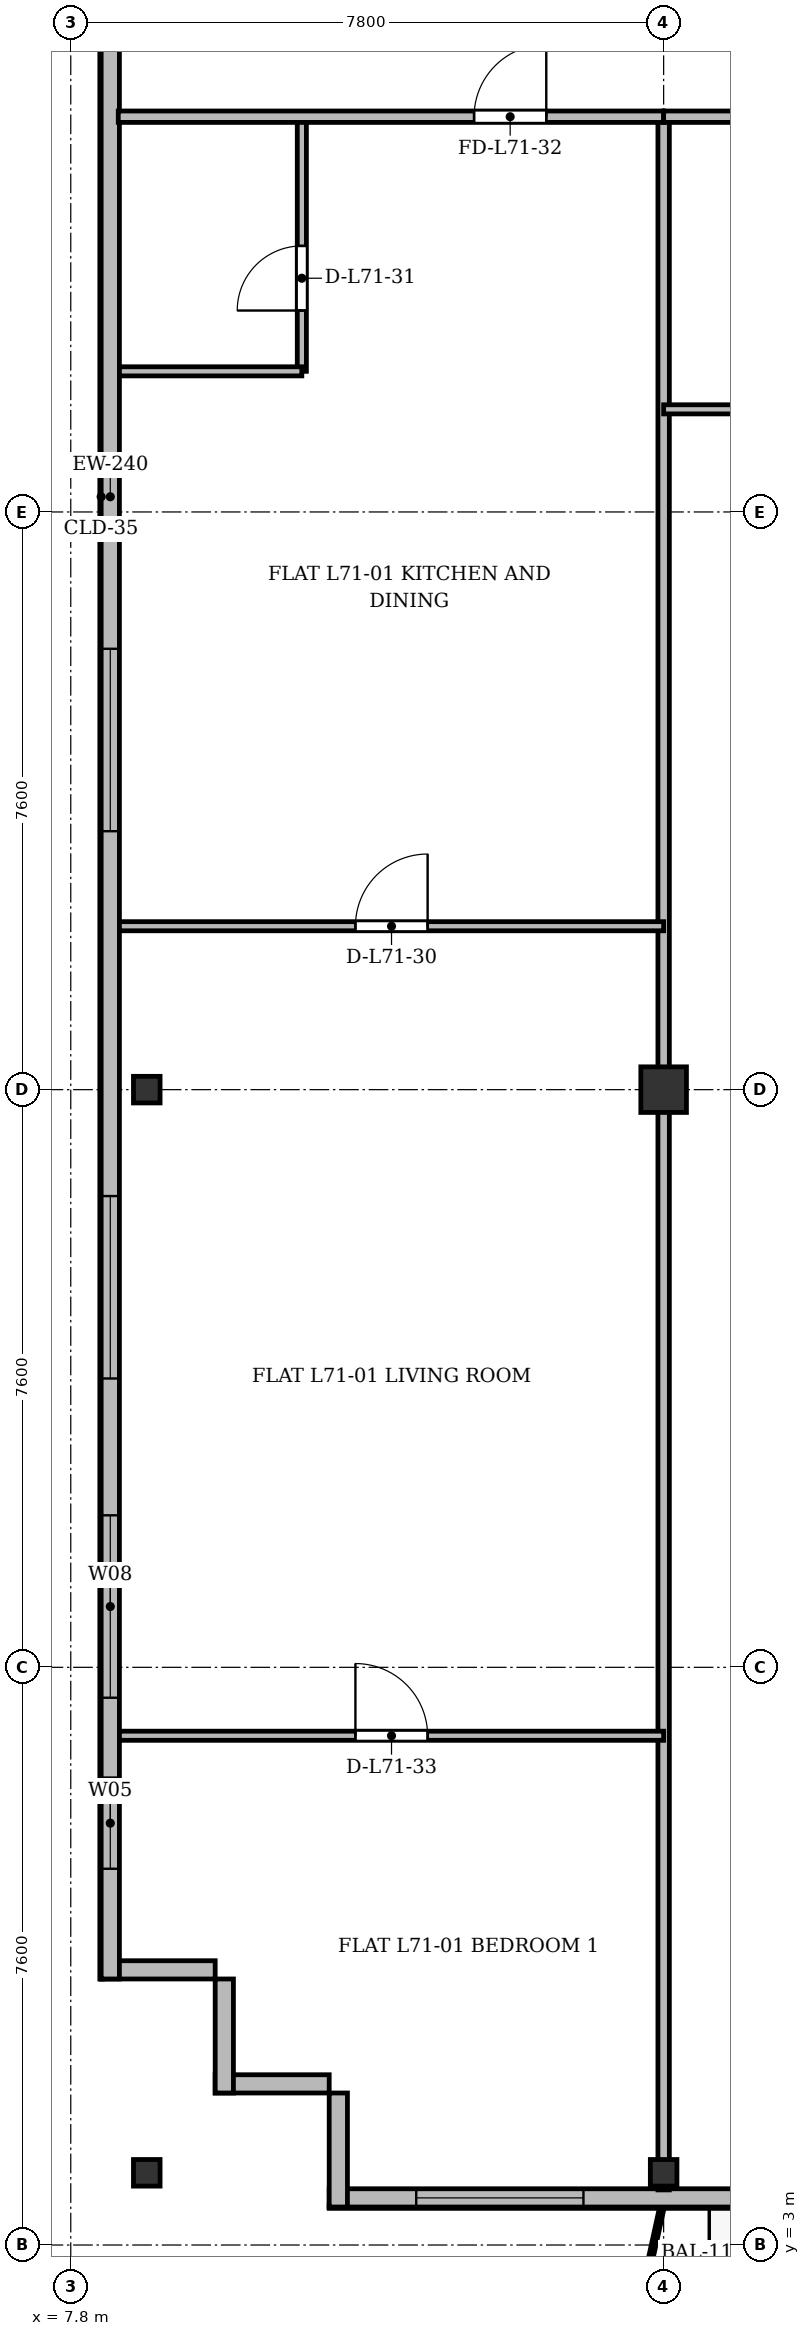
"""IFC4 building model, lengths in metres.
Left out: names, types, materials, properties, quantities, classifications, styles, units other than length and angle.
Written with IfcOpenShell. Run it as: python <this file> out.ifc"""

import sys

from ifc_helpers import new_model, si_unit, direction, frame, frame_2d, origin, origin_2d, place, context, subcontext, project, spatial, rectangle, i_section, extrude, source, transform, mapped, element, fill, save


model = new_model("IFC4")
c1 = context("Model", 3, precision=1e-05, world=origin(), true_north=direction((0.0, 1.0)))
c2 = subcontext(c1, "Body", "Model", "MODEL_VIEW")
j1 = project(units=[si_unit("LENGTHUNIT", "METRE"), si_unit("PLANEANGLEUNIT", "RADIAN")], contexts=[c1])
p1 = place(None, origin())
s1 = spatial("IfcSite", under=j1, at=p1, CompositionType="ELEMENT")
p2 = place(p1, origin())
s2 = spatial("IfcBuilding", under=s1, at=p2, CompositionType="ELEMENT")
p3 = place(p2, frame((0.0, 0.0, 273.9)))
s3 = spatial("IfcBuildingStorey", under=s2, at=p3, CompositionType="ELEMENT", Elevation=273.9)
m1 = source(origin(), c2, "Body", "SweptSolid", [
    extrude(i_section(OverallWidth=0.35, OverallDepth=0.35, WebThickness=0.018, FlangeThickness=0.028, at=origin_2d()), origin(), (0.0, 0.0, 1.0), 3.6),
])
for number, where, z_axis, x_axis in (
    (1, (8.8, 3.95, 0.0), (0.0, 0.0, 1.0), (1.0, 0.0, 0.0)),
    (2, (8.8, 18.2, 0.0), (0.0, 0.0, 1.0), (1.0, 0.0, 0.0)),
    (3, (15.6, 3.95, 0.0), (0.0, 0.0, 1.0), (1.0, 0.0, 0.0)),
):
    element("IfcColumn", number, at=place(p3, frame(where, z_axis=z_axis, x_axis=x_axis)), inside=s3, PredefinedType="COLUMN", context=c2, shape_type="MappedRepresentation", body=[
        mapped(m1, transform((0.0, 0.0, 0.0), x_axis=(1.0, 0.0, 0.0), y_axis=(0.0, 1.0, 0.0), z_axis=(0.0, 0.0, 1.0), scale=1.0)),
    ])
m2 = source(origin(), c2, "Body", "SweptSolid", [
    extrude(rectangle(XDim=0.6, YDim=0.6, at=origin_2d()), origin(), (0.0, 0.0, 1.0), 3.6),
])
p4 = place(p3, frame((15.6, 18.2, 0.0), z_axis=(0.0, 0.0, 1.0), x_axis=(1.0, 0.0, 0.0)))
e4 = element("IfcColumn", 4, at=p4, inside=s3, PredefinedType="COLUMN", context=c2, shape_type="MappedRepresentation", body=[
    mapped(m2, transform((0.0, 0.0, 0.0), x_axis=(1.0, 0.0, 0.0), y_axis=(0.0, 1.0, 0.0), z_axis=(0.0, 0.0, 1.0), scale=1.0)),
])
for number, where, z_axis, x_axis in (
    (5, (11.2, 5.12, 0.0), (0.0, 0.0, 1.0), (-1.0, 0.0, 0.0)),
    (6, (9.82, 5.0, 0.0), (0.0, 0.0, 1.0), (0.0, 1.0, 0.0)),
):
    element("IfcWall", number, at=place(p3, frame(where, z_axis=z_axis, x_axis=x_axis)), inside=s3, PredefinedType="SOLIDWALL", context=c2, shape_type="SweptSolid", body=[
        extrude(rectangle(XDim=1.5, YDim=0.24, at=frame_2d((0.75, 0.0))), origin(), (0.0, 0.0, 1.0), 3.37),
    ])
p5 = place(p3, frame((9.7, 6.62, 0.0), z_axis=(0.0, 0.0, 1.0), x_axis=(-1.0, 0.0, 0.0)))
e7 = element("IfcWall", 7, at=p5, inside=s3, PredefinedType="SOLIDWALL", context=c2, shape_type="SweptSolid", body=[
    extrude(rectangle(XDim=1.5, YDim=0.24, at=frame_2d((0.75, 0.0))), origin(), (0.0, 0.0, 1.0), 2.87),
])
p6 = place(p3, frame((8.32, 6.5, 0.0), z_axis=(0.0, 0.0, 1.0), x_axis=(0.0, 1.0, 0.0)))
e8 = element("IfcWall", 8, at=p6, inside=s3, PredefinedType="SOLIDWALL", context=c2, shape_type="SweptSolid", body=[
    extrude(rectangle(XDim=39.0, YDim=0.24, at=frame_2d((19.5, 0.0))), origin(), (0.0, 0.0, 1.0), 3.37),
])
p7 = place(p6, frame((1.45, 0.0, 0.92)))
e9 = element("IfcOpeningElement", 9, at=p7, cuts=e8, PredefinedType="OPENING", context=c2, shape_type="SweptSolid", body=[
    extrude(rectangle(XDim=1.2, YDim=1.65, at=frame_2d((0.6, 0.825))), frame((0.0, 0.13, 0.0), z_axis=(0.0, -1.0, 0.0), x_axis=(1.0, 0.0, 0.0)), (0.0, 0.0, 1.0), 0.26),
])
p8 = place(p6, frame((3.7, 0.0, 0.92)))
e10 = element("IfcOpeningElement", 10, at=p8, cuts=e8, PredefinedType="OPENING", context=c2, shape_type="SweptSolid", body=[
    extrude(rectangle(XDim=2.4, YDim=2.1, at=frame_2d((1.2, 1.05))), frame((0.0, 0.13, 0.0), z_axis=(0.0, -1.0, 0.0), x_axis=(1.0, 0.0, 0.0)), (0.0, 0.0, 1.0), 0.26),
])
p9 = place(p6, frame((7.9, 0.0, 0.92)))
e11 = element("IfcOpeningElement", 11, at=p9, cuts=e8, PredefinedType="OPENING", context=c2, shape_type="SweptSolid", body=[
    extrude(rectangle(XDim=2.4, YDim=2.1, at=frame_2d((1.2, 1.05))), frame((0.0, 0.13, 0.0), z_axis=(0.0, -1.0, 0.0), x_axis=(1.0, 0.0, 0.0)), (0.0, 0.0, 1.0), 0.26),
])
p10 = place(p6, frame((15.1, 0.0, 0.92)))
e12 = element("IfcOpeningElement", 12, at=p10, cuts=e8, PredefinedType="OPENING", context=c2, shape_type="SweptSolid", body=[
    extrude(rectangle(XDim=2.4, YDim=2.1, at=frame_2d((1.2, 1.05))), frame((0.0, 0.13, 0.0), z_axis=(0.0, -1.0, 0.0), x_axis=(1.0, 0.0, 0.0)), (0.0, 0.0, 1.0), 0.26),
])
p11 = place(p6, frame((29.1, 0.0, 0.92)))
e13 = element("IfcOpeningElement", 13, at=p11, cuts=e8, PredefinedType="OPENING", context=c2, shape_type="SweptSolid", body=[
    extrude(rectangle(XDim=2.4, YDim=2.1, at=frame_2d((1.2, 1.05))), frame((0.0, 0.13, 0.0), z_axis=(0.0, -1.0, 0.0), x_axis=(1.0, 0.0, 0.0)), (0.0, 0.0, 1.0), 0.26),
])
p12 = place(p6, frame((33.3, 0.0, 0.92)))
e14 = element("IfcOpeningElement", 14, at=p12, cuts=e8, PredefinedType="OPENING", context=c2, shape_type="SweptSolid", body=[
    extrude(rectangle(XDim=1.2, YDim=1.65, at=frame_2d((0.6, 0.825))), frame((0.0, 0.13, 0.0), z_axis=(0.0, -1.0, 0.0), x_axis=(1.0, 0.0, 0.0)), (0.0, 0.0, 1.0), 0.26),
])
p13 = place(p6, frame((36.65, 0.0, 0.92)))
e15 = element("IfcOpeningElement", 15, at=p13, cuts=e8, PredefinedType="OPENING", context=c2, shape_type="SweptSolid", body=[
    extrude(rectangle(XDim=1.2, YDim=1.65, at=frame_2d((0.6, 0.825))), frame((0.0, 0.13, 0.0), z_axis=(0.0, -1.0, 0.0), x_axis=(1.0, 0.0, 0.0)), (0.0, 0.0, 1.0), 0.26),
])
p14 = place(p3, frame((63.2, 3.62, 0.0), z_axis=(0.0, 0.0, 1.0), x_axis=(-1.0, 0.0, 0.0)))
e16 = element("IfcWall", 16, at=p14, inside=s3, PredefinedType="SOLIDWALL", context=c2, shape_type="SweptSolid", body=[
    extrude(rectangle(XDim=52.0, YDim=0.24, at=frame_2d((26.0, 0.0))), origin(), (0.0, 0.0, 1.0), 3.37),
])
p15 = place(p14, frame((1.145, 0.0, 0.9)))
e17 = element("IfcOpeningElement", 17, at=p15, cuts=e16, PredefinedType="OPENING", context=c2, shape_type="SweptSolid", body=[
    extrude(rectangle(XDim=2.2, YDim=1.8, at=frame_2d((1.1, 0.9))), frame((0.0, 0.13, 0.0), z_axis=(0.0, -1.0, 0.0), x_axis=(1.0, 0.0, 0.0)), (0.0, 0.0, 1.0), 0.26),
])
p16 = place(p14, frame((5.45, 0.0, 0.9)))
e18 = element("IfcOpeningElement", 18, at=p16, cuts=e16, PredefinedType="OPENING", context=c2, shape_type="SweptSolid", body=[
    extrude(rectangle(XDim=1.5, YDim=1.75, at=frame_2d((0.75, 0.875))), frame((0.0, 0.13, 0.0), z_axis=(0.0, -1.0, 0.0), x_axis=(1.0, 0.0, 0.0)), (0.0, 0.0, 1.0), 0.26),
])
p17 = place(p14, frame((9.1, 0.0, 0.9)))
e19 = element("IfcOpeningElement", 19, at=p17, cuts=e16, PredefinedType="OPENING", context=c2, shape_type="SweptSolid", body=[
    extrude(rectangle(XDim=2.0, YDim=1.95, at=frame_2d((1.0, 0.975))), frame((0.0, 0.13, 0.0), z_axis=(0.0, -1.0, 0.0), x_axis=(1.0, 0.0, 0.0)), (0.0, 0.0, 1.0), 0.26),
])
p18 = place(p14, frame((14.017, 0.0, 0.0)))
e20 = element("IfcOpeningElement", 20, at=p18, cuts=e16, PredefinedType="OPENING", context=c2, shape_type="SweptSolid", body=[
    extrude(rectangle(XDim=1.2, YDim=2.2, at=frame_2d((0.6, 1.1))), frame((0.0, 0.13, 0.0), z_axis=(0.0, -1.0, 0.0), x_axis=(1.0, 0.0, 0.0)), (0.0, 0.0, 1.0), 0.26),
])
p19 = place(p14, frame((25.1, 0.0, 0.9)))
e21 = element("IfcOpeningElement", 21, at=p19, cuts=e16, PredefinedType="OPENING", context=c2, shape_type="SweptSolid", body=[
    extrude(rectangle(XDim=1.8, YDim=1.8, at=frame_2d((0.9, 0.9))), frame((0.0, 0.13, 0.0), z_axis=(0.0, -1.0, 0.0), x_axis=(1.0, 0.0, 0.0)), (0.0, 0.0, 1.0), 0.26),
])
p20 = place(p14, frame((33.05, 0.0, 0.9)))
e22 = element("IfcOpeningElement", 22, at=p20, cuts=e16, PredefinedType="OPENING", context=c2, shape_type="SweptSolid", body=[
    extrude(rectangle(XDim=1.5, YDim=1.75, at=frame_2d((0.75, 0.875))), frame((0.0, 0.13, 0.0), z_axis=(0.0, -1.0, 0.0), x_axis=(1.0, 0.0, 0.0)), (0.0, 0.0, 1.0), 0.26),
])
p21 = place(p14, frame((35.45, 0.0, 0.9)))
e23 = element("IfcOpeningElement", 23, at=p21, cuts=e16, PredefinedType="OPENING", context=c2, shape_type="SweptSolid", body=[
    extrude(rectangle(XDim=1.5, YDim=1.75, at=frame_2d((0.75, 0.875))), frame((0.0, 0.13, 0.0), z_axis=(0.0, -1.0, 0.0), x_axis=(1.0, 0.0, 0.0)), (0.0, 0.0, 1.0), 0.26),
])
p22 = place(p14, frame((37.85, 0.0, 0.9)))
e24 = element("IfcOpeningElement", 24, at=p22, cuts=e16, PredefinedType="OPENING", context=c2, shape_type="SweptSolid", body=[
    extrude(rectangle(XDim=1.5, YDim=1.75, at=frame_2d((0.75, 0.875))), frame((0.0, 0.13, 0.0), z_axis=(0.0, -1.0, 0.0), x_axis=(1.0, 0.0, 0.0)), (0.0, 0.0, 1.0), 0.26),
])
p23 = place(p14, frame((41.452, 0.0, 0.0)))
e25 = element("IfcOpeningElement", 25, at=p23, cuts=e16, PredefinedType="OPENING", context=c2, shape_type="SweptSolid", body=[
    extrude(rectangle(XDim=1.2, YDim=2.2, at=frame_2d((0.6, 1.1))), frame((0.0, 0.13, 0.0), z_axis=(0.0, -1.0, 0.0), x_axis=(1.0, 0.0, 0.0)), (0.0, 0.0, 1.0), 0.26),
])
p24 = place(p14, frame((44.5, 0.0, 0.9)))
e26 = element("IfcOpeningElement", 26, at=p24, cuts=e16, PredefinedType="OPENING", context=c2, shape_type="SweptSolid", body=[
    extrude(rectangle(XDim=1.8, YDim=1.8, at=frame_2d((0.9, 0.9))), frame((0.0, 0.13, 0.0), z_axis=(0.0, -1.0, 0.0), x_axis=(1.0, 0.0, 0.0)), (0.0, 0.0, 1.0), 0.26),
])
p25 = place(p14, frame((48.655, 0.0, 0.9)))
e27 = element("IfcOpeningElement", 27, at=p25, cuts=e16, PredefinedType="OPENING", context=c2, shape_type="SweptSolid", body=[
    extrude(rectangle(XDim=2.2, YDim=1.8, at=frame_2d((1.1, 0.9))), frame((0.0, 0.13, 0.0), z_axis=(0.0, -1.0, 0.0), x_axis=(1.0, 0.0, 0.0)), (0.0, 0.0, 1.0), 0.26),
])
p26 = place(p3, frame((11.32, 3.5, 0.0), z_axis=(0.0, 0.0, 1.0), x_axis=(0.0, 1.0, 0.0)))
e28 = element("IfcWall", 28, at=p26, inside=s3, PredefinedType="SOLIDWALL", context=c2, shape_type="SweptSolid", body=[
    extrude(rectangle(XDim=1.5, YDim=0.24, at=frame_2d((0.75, 0.0))), origin(), (0.0, 0.0, 1.0), 2.92),
])
p27 = place(p3, frame((15.6, 3.725, 0.0), z_axis=(0.0, 0.0, 1.0), x_axis=(0.0, 1.0, 0.0)))
e29 = element("IfcWall", 29, at=p27, inside=s3, PredefinedType="PARTITIONING", context=c2, shape_type="SweptSolid", body=[
    extrude(rectangle(XDim=27.275, YDim=0.15, at=frame_2d((13.637, 0.0))), origin(), (0.0, 0.0, 1.0), 2.87),
])
p28 = place(p3, frame((8.44, 20.35, 0.0), z_axis=(0.0, 0.0, 1.0), x_axis=(1.0, 0.0, 0.0)))
e30 = element("IfcWall", 30, at=p28, inside=s3, PredefinedType="PARTITIONING", context=c2, shape_type="SweptSolid", body=[
    extrude(rectangle(XDim=7.16, YDim=0.12, at=frame_2d((3.58, 0.0))), origin(), (0.0, 0.0, 1.0), 2.87),
])
p29 = place(p28, frame((3.105, 0.0, 0.0)))
e31 = element("IfcOpeningElement", 31, at=p29, cuts=e30, PredefinedType="OPENING", context=c2, shape_type="SweptSolid", body=[
    extrude(rectangle(XDim=0.95, YDim=2.15, at=frame_2d((0.475, 1.075))), frame((0.0, 0.07, 0.0), z_axis=(0.0, -1.0, 0.0), x_axis=(1.0, 0.0, 0.0)), (0.0, 0.0, 1.0), 0.14),
])
p30 = place(p3, frame((10.84, 27.65, 0.0), z_axis=(0.0, 0.0, 1.0), x_axis=(0.0, 1.0, 0.0)))
e32 = element("IfcWall", 32, at=p30, inside=s3, PredefinedType="PARTITIONING", context=c2, shape_type="SweptSolid", body=[
    extrude(rectangle(XDim=3.35, YDim=0.12, at=frame_2d((1.675, 0.0))), origin(), (0.0, 0.0, 1.0), 3.37),
])
p31 = place(p30, frame((0.8, 0.0, 0.0)))
e33 = element("IfcOpeningElement", 33, at=p31, cuts=e32, PredefinedType="OPENING", context=c2, shape_type="SweptSolid", body=[
    extrude(rectangle(XDim=0.85, YDim=2.1, at=frame_2d((0.425, 1.05))), frame((0.0, 0.07, 0.0), z_axis=(0.0, -1.0, 0.0), x_axis=(1.0, 0.0, 0.0)), (0.0, 0.0, 1.0), 0.14),
])
p32 = place(p3, frame((8.44, 27.65, 0.0), z_axis=(0.0, 0.0, 1.0), x_axis=(1.0, 0.0, 0.0)))
e34 = element("IfcWall", 34, at=p32, inside=s3, PredefinedType="PARTITIONING", context=c2, shape_type="SweptSolid", body=[
    extrude(rectangle(XDim=2.4, YDim=0.12, at=frame_2d((1.2, 0.0))), origin(), (0.0, 0.0, 1.0), 2.87),
])
p33 = place(p3, frame((8.425, 31.0, 0.0), z_axis=(0.0, 0.0, 1.0), x_axis=(1.0, 0.0, 0.0)))
e35 = element("IfcWall", 35, at=p33, inside=s3, PredefinedType="PARTITIONING", context=c2, shape_type="SweptSolid", body=[
    extrude(rectangle(XDim=7.175, YDim=0.15, at=frame_2d((3.587, 0.0))), origin(), (0.0, 0.0, 1.0), 2.87),
])
p34 = place(p33, frame((4.681, 0.0, 0.0)))
e36 = element("IfcOpeningElement", 36, at=p34, cuts=e35, PredefinedType="OPENING", context=c2, shape_type="SweptSolid", body=[
    extrude(rectangle(XDim=0.95, YDim=2.15, at=frame_2d((0.475, 1.075))), frame((0.0, 0.085, 0.0), z_axis=(0.0, -1.0, 0.0), x_axis=(1.0, 0.0, 0.0)), (0.0, 0.0, 1.0), 0.17),
])
p35 = place(p3, frame((8.44, 9.7, 0.0), z_axis=(0.0, 0.0, 1.0), x_axis=(1.0, 0.0, 0.0)))
e37 = element("IfcWall", 37, at=p35, inside=s3, PredefinedType="PARTITIONING", context=c2, shape_type="SweptSolid", body=[
    extrude(rectangle(XDim=7.16, YDim=0.12, at=frame_2d((3.58, 0.0))), origin(), (0.0, 0.0, 1.0), 2.87),
])
p36 = place(p35, frame((3.105, 0.0, 0.0)))
e38 = element("IfcOpeningElement", 38, at=p36, cuts=e37, PredefinedType="OPENING", context=c2, shape_type="SweptSolid", body=[
    extrude(rectangle(XDim=0.95, YDim=2.15, at=frame_2d((0.475, 1.075))), frame((0.0, 0.07, 0.0), z_axis=(0.0, -1.0, 0.0), x_axis=(1.0, 0.0, 0.0)), (0.0, 0.0, 1.0), 0.14),
])
p37 = place(p3, frame((15.6, 31.0, 0.0), z_axis=(0.0, 0.0, 1.0), x_axis=(1.0, 0.0, 0.0)))
e39 = element("IfcWall", 39, at=p37, inside=s3, PredefinedType="PARTITIONING", context=c2, shape_type="SweptSolid", body=[
    extrude(rectangle(XDim=4.4, YDim=0.15, at=frame_2d((2.2, 0.0))), origin(), (0.0, 0.0, 1.0), 2.87),
])
p38 = place(p37, frame((1.725, 0.0, 0.0)))
e40 = element("IfcOpeningElement", 40, at=p38, cuts=e39, PredefinedType="OPENING", context=c2, shape_type="SweptSolid", body=[
    extrude(rectangle(XDim=0.95, YDim=2.15, at=frame_2d((0.475, 1.075))), frame((0.0, 0.085, 0.0), z_axis=(0.0, -1.0, 0.0), x_axis=(1.0, 0.0, 0.0)), (0.0, 0.0, 1.0), 0.17),
])
p39 = place(p3, frame((15.6, 27.15, 0.0), z_axis=(0.0, 0.0, 1.0), x_axis=(1.0, 0.0, 0.0)))
e41 = element("IfcWall", 41, at=p39, inside=s3, PredefinedType="PARTITIONING", context=c2, shape_type="SweptSolid", body=[
    extrude(rectangle(XDim=4.4, YDim=0.12, at=frame_2d((2.2, 0.0))), origin(), (0.0, 0.0, 1.0), 2.87),
])
p40 = place(p39, frame((1.725, 0.0, 0.0)))
e42 = element("IfcOpeningElement", 42, at=p40, cuts=e41, PredefinedType="OPENING", context=c2, shape_type="SweptSolid", body=[
    extrude(rectangle(XDim=0.95, YDim=2.15, at=frame_2d((0.475, 1.075))), frame((0.0, 0.07, 0.0), z_axis=(0.0, -1.0, 0.0), x_axis=(1.0, 0.0, 0.0)), (0.0, 0.0, 1.0), 0.14),
])
m3 = source(origin(), c2, "Body", "SweptSolid", [
    extrude(rectangle(XDim=1.2, YDim=1.65, at=frame_2d((0.6, 0.825))), frame((0.0, 0.03, 0.0), z_axis=(0.0, -1.0, 0.0), x_axis=(1.0, 0.0, 0.0)), (0.0, 0.0, 1.0), 0.06),
])
p41 = place(p7, origin())
e43 = element("IfcWindow", 43, at=p41, inside=s3, PartitioningType="SINGLE_PANEL", PredefinedType="WINDOW", context=c2, shape_type="MappedRepresentation", body=[
    mapped(m3, transform((0.0, 0.0, 0.0), x_axis=(1.0, 0.0, 0.0), y_axis=(0.0, 1.0, 0.0), z_axis=(0.0, 0.0, 1.0), scale=1.0)),
])
fill(e9, e43)
m4 = source(origin(), c2, "Body", "SweptSolid", [
    extrude(rectangle(XDim=2.4, YDim=2.1, at=frame_2d((1.2, 1.05))), frame((0.0, 0.03, 0.0), z_axis=(0.0, -1.0, 0.0), x_axis=(1.0, 0.0, 0.0)), (0.0, 0.0, 1.0), 0.06),
])
p42 = place(p8, origin())
e44 = element("IfcWindow", 44, at=p42, inside=s3, PartitioningType="SINGLE_PANEL", PredefinedType="WINDOW", context=c2, shape_type="MappedRepresentation", body=[
    mapped(m4, transform((0.0, 0.0, 0.0), x_axis=(1.0, 0.0, 0.0), y_axis=(0.0, 1.0, 0.0), z_axis=(0.0, 0.0, 1.0), scale=1.0)),
])
fill(e10, e44)
p43 = place(p9, origin())
e45 = element("IfcWindow", 45, at=p43, inside=s3, PartitioningType="SINGLE_PANEL", PredefinedType="WINDOW", context=c2, shape_type="MappedRepresentation", body=[
    mapped(m4, transform((0.0, 0.0, 0.0), x_axis=(1.0, 0.0, 0.0), y_axis=(0.0, 1.0, 0.0), z_axis=(0.0, 0.0, 1.0), scale=1.0)),
])
fill(e11, e45)
p44 = place(p10, origin())
e46 = element("IfcWindow", 46, at=p44, inside=s3, PartitioningType="SINGLE_PANEL", PredefinedType="WINDOW", context=c2, shape_type="MappedRepresentation", body=[
    mapped(m4, transform((0.0, 0.0, 0.0), x_axis=(1.0, 0.0, 0.0), y_axis=(0.0, 1.0, 0.0), z_axis=(0.0, 0.0, 1.0), scale=1.0)),
])
fill(e12, e46)
m5 = source(origin(), c2, "Body", "SweptSolid", [
    extrude(rectangle(XDim=2.2, YDim=1.8, at=frame_2d((1.1, 0.9))), frame((0.0, 0.03, 0.0), z_axis=(0.0, -1.0, 0.0), x_axis=(1.0, 0.0, 0.0)), (0.0, 0.0, 1.0), 0.06),
])
p45 = place(p25, origin())
e47 = element("IfcWindow", 47, at=p45, inside=s3, PartitioningType="SINGLE_PANEL", PredefinedType="WINDOW", context=c2, shape_type="MappedRepresentation", body=[
    mapped(m5, transform((0.0, 0.0, 0.0), x_axis=(1.0, 0.0, 0.0), y_axis=(0.0, 1.0, 0.0), z_axis=(0.0, 0.0, 1.0), scale=1.0)),
])
fill(e27, e47)
m6 = source(origin(), c2, "Body", "SweptSolid", [
    extrude(rectangle(XDim=0.95, YDim=2.15, at=frame_2d((0.475, 1.075))), frame((0.0, 0.025, 0.0), z_axis=(0.0, -1.0, 0.0), x_axis=(1.0, 0.0, 0.0)), (0.0, 0.0, 1.0), 0.05),
])
p46 = place(p29, origin())
e48 = element("IfcDoor", 48, at=p46, inside=s3, OperationType="SINGLE_SWING_RIGHT", PredefinedType="DOOR", context=c2, shape_type="MappedRepresentation", body=[
    mapped(m6, transform((0.0, 0.0, 0.0), x_axis=(1.0, 0.0, 0.0), y_axis=(0.0, 1.0, 0.0), z_axis=(0.0, 0.0, 1.0), scale=1.0)),
])
fill(e31, e48)
m7 = source(origin(), c2, "Body", "SweptSolid", [
    extrude(rectangle(XDim=0.85, YDim=2.1, at=frame_2d((0.425, 1.05))), frame((0.0, 0.025, 0.0), z_axis=(0.0, -1.0, 0.0), x_axis=(1.0, 0.0, 0.0)), (0.0, 0.0, 1.0), 0.05),
])
p47 = place(p31, origin())
e49 = element("IfcDoor", 49, at=p47, inside=s3, OperationType="SINGLE_SWING_LEFT", PredefinedType="DOOR", context=c2, shape_type="MappedRepresentation", body=[
    mapped(m7, transform((0.0, 0.0, 0.0), x_axis=(1.0, 0.0, 0.0), y_axis=(0.0, 1.0, 0.0), z_axis=(0.0, 0.0, 1.0), scale=1.0)),
])
fill(e33, e49)
p48 = place(p34, origin())
e50 = element("IfcDoor", 50, at=p48, inside=s3, OperationType="SINGLE_SWING_RIGHT", PredefinedType="DOOR", context=c2, shape_type="MappedRepresentation", body=[
    mapped(m6, transform((0.0, 0.0, 0.0), x_axis=(1.0, 0.0, 0.0), y_axis=(0.0, 1.0, 0.0), z_axis=(0.0, 0.0, 1.0), scale=1.0)),
])
fill(e36, e50)
p49 = place(p36, origin())
e51 = element("IfcDoor", 51, at=p49, inside=s3, OperationType="SINGLE_SWING_LEFT", PredefinedType="DOOR", context=c2, shape_type="MappedRepresentation", body=[
    mapped(m6, transform((0.0, 0.0, 0.0), x_axis=(1.0, 0.0, 0.0), y_axis=(0.0, 1.0, 0.0), z_axis=(0.0, 0.0, 1.0), scale=1.0)),
])
fill(e38, e51)
save(model, sys.argv[1])
